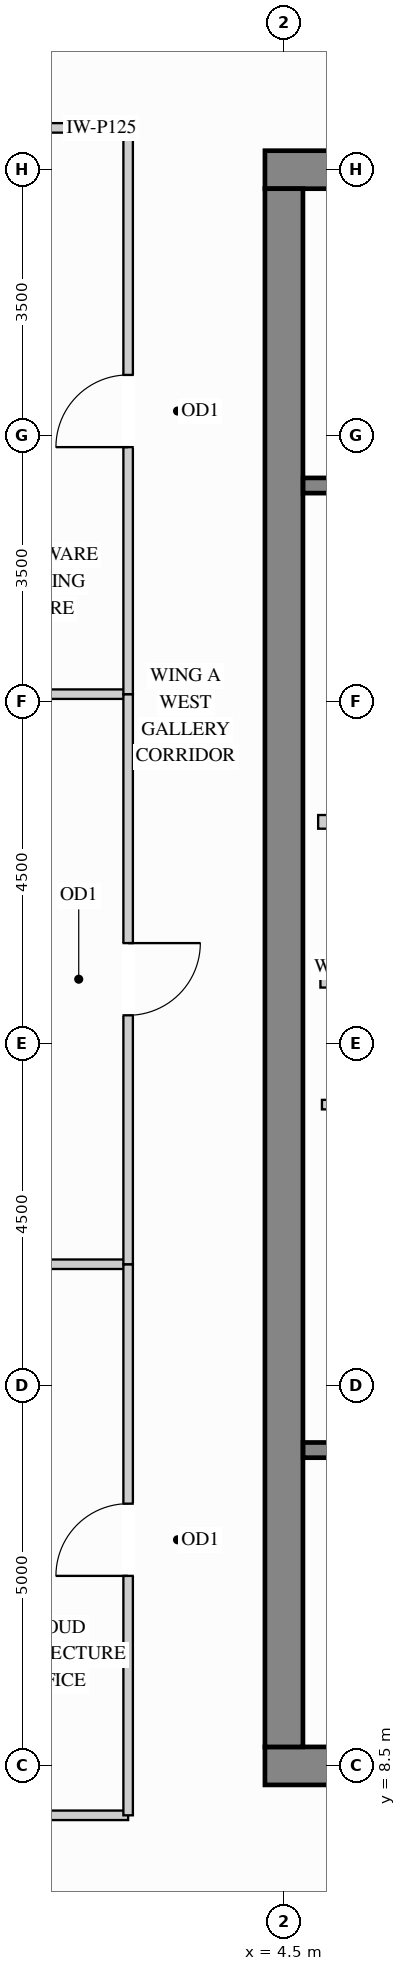
"""IFC4 building model, lengths in metres.
Left out: names, types, materials, properties, quantities, classifications, styles, units other than length and angle.
Written with IfcOpenShell. Run it as: python <this file> out.ifc"""

import sys

from ifc_helpers import new_model, si_unit, direction, frame, frame_2d, origin, place, context, subcontext, project, spatial, rectangle, extrude, source, transform, mapped, element, fill, save


model = new_model("IFC4")
c1 = context("Model", 3, precision=1e-05, world=origin(), true_north=direction((0.0, 1.0)))
c2 = subcontext(c1, "Body", "Model", "MODEL_VIEW")
j1 = project(units=[si_unit("LENGTHUNIT", "METRE"), si_unit("PLANEANGLEUNIT", "RADIAN")], contexts=[c1])
p1 = place(None, origin())
s1 = spatial("IfcSite", under=j1, at=p1, CompositionType="ELEMENT")
p2 = place(p1, origin())
s2 = spatial("IfcBuilding", under=s1, at=p2, CompositionType="ELEMENT")
p3 = place(p2, frame((0.0, 0.0, 273.6)))
s3 = spatial("IfcBuildingStorey", under=s2, at=p3, CompositionType="ELEMENT", Elevation=273.6)
m1 = source(origin(), c2, "Body", "SweptSolid", [
    extrude(rectangle(XDim=10.5, YDim=0.5, at=frame_2d((5.25, 0.0))), origin(), (0.0, 0.0, 1.0), 3.37),
])
for number, where, z_axis, x_axis in (
    (1, (4.25, 29.5, 0.0), (0.0, 0.0, 1.0), (1.0, 0.0, 0.0)),
    (2, (4.25, 8.5, 0.0), (0.0, 0.0, 1.0), (1.0, 0.0, 0.0)),
):
    element("IfcWall", number, at=place(p3, frame(where, z_axis=z_axis, x_axis=x_axis)), inside=s3, PredefinedType="SHEAR", context=c2, shape_type="MappedRepresentation", body=[
        mapped(m1, transform((0.0, 0.0, 0.0), x_axis=(1.0, 0.0, 0.0), y_axis=(0.0, 1.0, 0.0), z_axis=(0.0, 0.0, 1.0))),
    ])
m2 = source(origin(), c2, "Body", "SweptSolid", [
    extrude(rectangle(XDim=20.5, YDim=0.5, at=frame_2d((10.25, 0.0))), origin(), (0.0, 0.0, 1.0), 3.37),
])
p4 = place(p3, frame((4.5, 8.75, 0.0), z_axis=(0.0, 0.0, 1.0), x_axis=(0.0, 1.0, 0.0)))
e3 = element("IfcWall", 3, at=p4, inside=s3, PredefinedType="SHEAR", context=c2, shape_type="MappedRepresentation", body=[
    mapped(m2, transform((0.0, 0.0, 0.0), x_axis=(1.0, 0.0, 0.0), y_axis=(0.0, 1.0, 0.0), z_axis=(0.0, 0.0, 1.0))),
])
m3 = source(origin(), c2, "Body", "SweptSolid", [
    extrude(rectangle(XDim=2.2, YDim=0.18, at=frame_2d((1.1, 0.0))), origin(), (0.0, 0.0, 1.0), 3.355),
])
p5 = place(p3, frame((4.95, 20.92, 0.0), z_axis=(0.0, 0.0, 1.0), x_axis=(1.0, 0.0, 0.0)))
e4 = element("IfcWall", 4, at=p5, inside=s3, PredefinedType="PARTITIONING", context=c2, shape_type="MappedRepresentation", body=[
    mapped(m3, transform((0.0, 0.0, 0.0), x_axis=(1.0, 0.0, 0.0), y_axis=(0.0, 1.0, 0.0), z_axis=(0.0, 0.0, 1.0))),
])
p6 = place(p3, frame((5.0, 17.2, 0.0), z_axis=(0.0, 0.0, 1.0), x_axis=(1.0, 0.0, 0.0)))
e5 = element("IfcWall", 5, at=p6, inside=s3, PredefinedType="PARTITIONING", context=c2, shape_type="SweptSolid", body=[
    extrude(rectangle(XDim=2.4, YDim=0.125, at=frame_2d((1.2, 0.0))), origin(), (0.0, 0.0, 1.0), 3.355),
])
p7 = place(p6, frame((0.7, 0.0, 0.0)))
e6 = element("IfcOpeningElement", 6, at=p7, cuts=e5, PredefinedType="OPENING", context=c2, shape_type="SweptSolid", body=[
    extrude(rectangle(XDim=0.85, YDim=2.1, at=frame_2d((0.425, 1.05))), frame((0.0, 0.073, 0.0), z_axis=(0.0, -1.0, 0.0), x_axis=(1.0, 0.0, 0.0)), (0.0, 0.0, 1.0), 0.145),
])
m4 = source(origin(), c2, "Body", "SweptSolid", [
    extrude(rectangle(XDim=1.4, YDim=0.125, at=frame_2d((0.7, 0.0))), origin(), (0.0, 0.0, 1.0), 3.355),
])
p8 = place(p3, frame((1.05, 30.05, 0.0), z_axis=(0.0, 0.0, 1.0), x_axis=(1.0, 0.0, 0.0)))
e7 = element("IfcWall", 7, at=p8, inside=s3, PredefinedType="PARTITIONING", context=c2, shape_type="MappedRepresentation", body=[
    mapped(m4, transform((0.0, 0.0, 0.0), x_axis=(1.0, 0.0, 0.0), y_axis=(0.0, 1.0, 0.0), z_axis=(0.0, 0.0, 1.0))),
])
m5 = source(origin(), c2, "Body", "SweptSolid", [
    extrude(rectangle(XDim=2.098, YDim=0.125, at=frame_2d((1.049, 0.0))), origin(), (0.0, 0.0, 1.0), 3.355),
])
for number, where, z_axis, x_axis in (
    (8, (0.352, 7.85, 0.0), (0.0, 0.0, 1.0), (1.0, 0.0, 0.0)),
    (9, (0.352, 15.1, 0.0), (0.0, 0.0, 1.0), (1.0, 0.0, 0.0)),
):
    element("IfcWall", number, at=place(p3, frame(where, z_axis=z_axis, x_axis=x_axis)), inside=s3, PredefinedType="PARTITIONING", context=c2, shape_type="MappedRepresentation", body=[
        mapped(m5, transform((0.0, 0.0, 0.0), x_axis=(1.0, 0.0, 0.0), y_axis=(0.0, 1.0, 0.0), z_axis=(0.0, 0.0, 1.0))),
    ])
p9 = place(p3, frame((1.05, 22.6, 0.0), z_axis=(0.0, 0.0, 1.0), x_axis=(1.0, 0.0, 0.0)))
e10 = element("IfcWall", 10, at=p9, inside=s3, PredefinedType="PARTITIONING", context=c2, shape_type="MappedRepresentation", body=[
    mapped(m4, transform((0.0, 0.0, 0.0), x_axis=(1.0, 0.0, 0.0), y_axis=(0.0, 1.0, 0.0), z_axis=(0.0, 0.0, 1.0))),
])
p10 = place(p3, frame((2.45, 7.85, 0.0), z_axis=(0.0, 0.0, 1.0), x_axis=(0.0, 1.0, 0.0)))
e11 = element("IfcWall", 11, at=p10, inside=s3, PredefinedType="PARTITIONING", context=c2, shape_type="SweptSolid", body=[
    extrude(rectangle(XDim=7.25, YDim=0.125, at=frame_2d((3.625, 0.0))), origin(), (0.0, 0.0, 1.0), 3.355),
])
p11 = place(p10, frame((3.15, 0.0, 0.0)))
e12 = element("IfcOpeningElement", 12, at=p11, cuts=e11, PredefinedType="OPENING", context=c2, shape_type="SweptSolid", body=[
    extrude(rectangle(XDim=0.95, YDim=2.15, at=frame_2d((0.475, 1.075))), frame((0.0, 0.073, 0.0), z_axis=(0.0, -1.0, 0.0), x_axis=(1.0, 0.0, 0.0)), (0.0, 0.0, 1.0), 0.145),
])
p12 = place(p3, frame((2.45, 15.1, 0.0), z_axis=(0.0, 0.0, 1.0), x_axis=(0.0, 1.0, 0.0)))
e13 = element("IfcWall", 13, at=p12, inside=s3, PredefinedType="PARTITIONING", context=c2, shape_type="SweptSolid", body=[
    extrude(rectangle(XDim=7.5, YDim=0.125, at=frame_2d((3.75, 0.0))), origin(), (0.0, 0.0, 1.0), 3.355),
])
p13 = place(p12, frame((3.275, 0.0, 0.0)))
e14 = element("IfcOpeningElement", 14, at=p13, cuts=e13, PredefinedType="OPENING", context=c2, shape_type="SweptSolid", body=[
    extrude(rectangle(XDim=0.95, YDim=2.15, at=frame_2d((0.475, 1.075))), frame((0.0, 0.073, 0.0), z_axis=(0.0, -1.0, 0.0), x_axis=(1.0, 0.0, 0.0)), (0.0, 0.0, 1.0), 0.145),
])
p14 = place(p3, frame((2.45, 22.6, 0.0), z_axis=(0.0, 0.0, 1.0), x_axis=(0.0, 1.0, 0.0)))
e15 = element("IfcWall", 15, at=p14, inside=s3, PredefinedType="PARTITIONING", context=c2, shape_type="SweptSolid", body=[
    extrude(rectangle(XDim=7.45, YDim=0.125, at=frame_2d((3.725, 0.0))), origin(), (0.0, 0.0, 1.0), 3.355),
])
p15 = place(p14, frame((3.25, 0.0, 0.0)))
e16 = element("IfcOpeningElement", 16, at=p15, cuts=e15, PredefinedType="OPENING", context=c2, shape_type="SweptSolid", body=[
    extrude(rectangle(XDim=0.95, YDim=2.15, at=frame_2d((0.475, 1.075))), frame((0.0, 0.073, 0.0), z_axis=(0.0, -1.0, 0.0), x_axis=(1.0, 0.0, 0.0)), (0.0, 0.0, 1.0), 0.145),
])
m6 = source(origin(), c2, "Body", "SweptSolid", [
    extrude(rectangle(XDim=2.09, YDim=0.2, at=frame_2d((1.045, 0.0))), origin(), (0.0, 0.0, 1.0), 3.355),
])
p16 = place(p3, frame((4.98, 18.84, 0.0), z_axis=(0.0, 0.0, 1.0), x_axis=(1.0, 0.0, 0.0)))
e17 = element("IfcWall", 17, at=p16, inside=s3, PredefinedType="PARTITIONING", context=c2, shape_type="MappedRepresentation", body=[
    mapped(m6, transform((0.0, 0.0, 0.0), x_axis=(1.0, 0.0, 0.0), y_axis=(0.0, 1.0, 0.0), z_axis=(0.0, 0.0, 1.0))),
])
p17 = place(p3, frame((4.752, 12.655, 0.0), z_axis=(0.0, 0.0, 1.0), x_axis=(1.0, 0.0, 0.0)))
e18 = element("IfcWall", 18, at=p17, inside=s3, PredefinedType="SHEAR", context=c2, shape_type="SweptSolid", body=[
    extrude(rectangle(XDim=7.653, YDim=0.2, at=frame_2d((3.827, 0.0))), origin(), (0.0, 0.0, 1.0), 3.37),
])
p18 = place(p17, frame((0.4, 0.0, 0.0)))
e19 = element("IfcOpeningElement", 19, at=p18, cuts=e18, PredefinedType="OPENING", context=c2, shape_type="SweptSolid", body=[
    extrude(rectangle(XDim=1.1, YDim=2.15, at=frame_2d((0.55, 1.075))), frame((0.0, 0.11, 0.0), z_axis=(0.0, -1.0, 0.0), x_axis=(1.0, 0.0, 0.0)), (0.0, 0.0, 1.0), 0.22),
])
p19 = place(p3, frame((4.752, 25.345, 0.0), z_axis=(0.0, 0.0, 1.0), x_axis=(1.0, 0.0, 0.0)))
e20 = element("IfcWall", 20, at=p19, inside=s3, PredefinedType="SHEAR", context=c2, shape_type="SweptSolid", body=[
    extrude(rectangle(XDim=7.653, YDim=0.2, at=frame_2d((3.827, 0.0))), origin(), (0.0, 0.0, 1.0), 3.37),
])
p20 = place(p19, frame((0.4, 0.0, 0.0)))
e21 = element("IfcOpeningElement", 21, at=p20, cuts=e20, PredefinedType="OPENING", context=c2, shape_type="SweptSolid", body=[
    extrude(rectangle(XDim=1.1, YDim=2.15, at=frame_2d((0.55, 1.075))), frame((0.0, 0.11, 0.0), z_axis=(0.0, -1.0, 0.0), x_axis=(1.0, 0.0, 0.0)), (0.0, 0.0, 1.0), 0.22),
])
m7 = source(origin(), c2, "Body", "SweptSolid", [
    extrude(rectangle(XDim=0.95, YDim=2.15, at=frame_2d((0.475, 1.075))), frame((0.0, 0.025, 0.0), z_axis=(0.0, -1.0, 0.0), x_axis=(1.0, 0.0, 0.0)), (0.0, 0.0, 1.0), 0.05),
])
p21 = place(p11, origin())
e22 = element("IfcDoor", 22, at=p21, inside=s3, OperationType="SINGLE_SWING_LEFT", PredefinedType="DOOR", context=c2, shape_type="MappedRepresentation", body=[
    mapped(m7, transform((0.0, 0.0, 0.0), x_axis=(1.0, 0.0, 0.0), y_axis=(0.0, 1.0, 0.0), z_axis=(0.0, 0.0, 1.0))),
])
fill(e12, e22)
p22 = place(p13, origin())
e23 = element("IfcDoor", 23, at=p22, inside=s3, OperationType="SINGLE_SWING_RIGHT", PredefinedType="DOOR", context=c2, shape_type="MappedRepresentation", body=[
    mapped(m7, transform((0.0, 0.0, 0.0), x_axis=(1.0, 0.0, 0.0), y_axis=(0.0, 1.0, 0.0), z_axis=(0.0, 0.0, 1.0))),
])
fill(e14, e23)
p23 = place(p15, origin())
e24 = element("IfcDoor", 24, at=p23, inside=s3, OperationType="SINGLE_SWING_LEFT", PredefinedType="DOOR", context=c2, shape_type="MappedRepresentation", body=[
    mapped(m7, transform((0.0, 0.0, 0.0), x_axis=(1.0, 0.0, 0.0), y_axis=(0.0, 1.0, 0.0), z_axis=(0.0, 0.0, 1.0))),
])
fill(e16, e24)
save(model, sys.argv[1])
